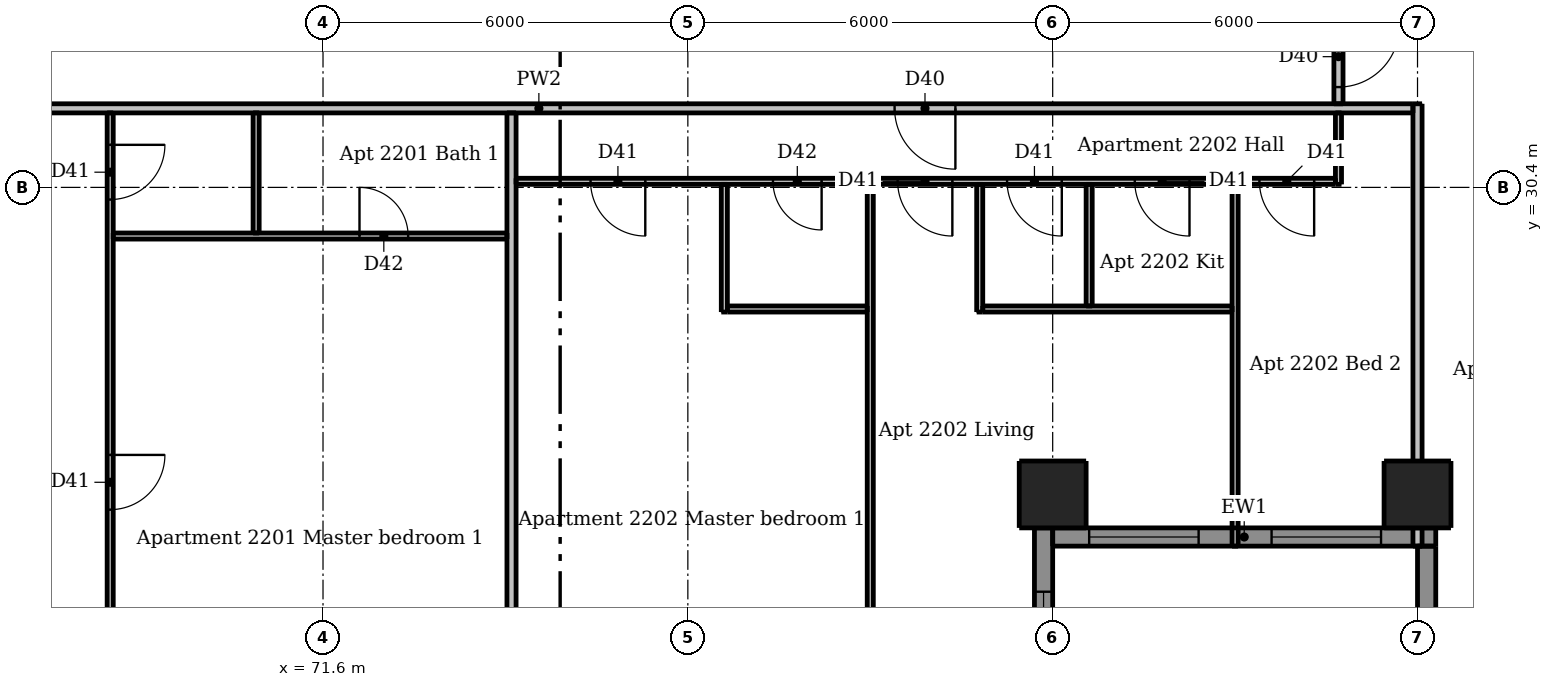
"""IFC4 building model, lengths in metres.
Left out: names, types, materials, properties, quantities, classifications, styles, units other than length and angle.
Written with IfcOpenShell. Run it as: python <this file> out.ifc"""

import sys

from ifc_helpers import new_model, si_unit, direction, frame, frame_2d, origin, origin_2d, place, context, subcontext, project, spatial, rectangle, extrude, element, fill, save


model = new_model("IFC4")
c1 = context("Model", 3, precision=1e-05, world=origin(), true_north=direction((0.0, 1.0)))
c2 = subcontext(c1, "Body", "Model", "MODEL_VIEW")
j1 = project(units=[si_unit("LENGTHUNIT", "METRE"), si_unit("PLANEANGLEUNIT", "RADIAN")], contexts=[c1])
p1 = place(None, origin())
s1 = spatial("IfcSite", under=j1, at=p1, CompositionType="ELEMENT")
p2 = place(p1, origin())
s2 = spatial("IfcBuilding", under=s1, at=p2, CompositionType="ELEMENT")
p3 = place(p2, frame((0.0, 0.0, 85.3)))
s3 = spatial("IfcBuildingStorey", under=s2, at=p3, CompositionType="ELEMENT", Elevation=85.3)
for number, where, z_axis, x_axis in (
    (1, (83.6, 25.35, 0.0), (0.0, 0.0, 1.0), (1.0, 0.0, 0.0)),
    (2, (89.6, 25.35, 0.0), (0.0, 0.0, 1.0), (1.0, 0.0, 0.0)),
):
    element("IfcColumn", number, at=place(p3, frame(where, z_axis=z_axis, x_axis=x_axis)), inside=s3, PredefinedType="COLUMN", context=c2, shape_type="SweptSolid", body=[
        extrude(rectangle(XDim=1.1, YDim=1.1, at=origin_2d()), origin(), (0.0, 0.0, 1.0), 3.05),
    ])
p4 = place(p3, frame((83.45, 21.5, 0.0), z_axis=(0.0, 0.0, 1.0), x_axis=(0.0, 1.0, 0.0)))
e3 = element("IfcWall", 3, at=p4, inside=s3, PredefinedType="SOLIDWALL", context=c2, shape_type="SweptSolid", body=[
    extrude(rectangle(XDim=3.3, YDim=0.3, at=frame_2d((1.65, 0.0))), origin(), (0.0, 0.0, 1.0), 3.05),
])
p5 = place(p4, frame((0.75, 0.0, 0.9)))
e4 = element("IfcOpeningElement", 4, at=p5, cuts=e3, PredefinedType="OPENING", context=c2, shape_type="SweptSolid", body=[
    extrude(rectangle(XDim=1.5, YDim=1.5, at=frame_2d((0.75, 0.75))), frame((0.0, 0.16, 0.0), z_axis=(0.0, -1.0, 0.0), x_axis=(1.0, 0.0, 0.0)), (0.0, 0.0, 1.0), 0.32),
])
p6 = place(p3, frame((89.75, 24.5, 0.0), z_axis=(0.0, 0.0, 1.0), x_axis=(0.0, -1.0, 0.0)))
e5 = element("IfcWall", 5, at=p6, inside=s3, PredefinedType="SOLIDWALL", context=c2, shape_type="SweptSolid", body=[
    extrude(rectangle(XDim=4.5, YDim=0.3, at=frame_2d((2.25, 0.0))), origin(), (0.0, 0.0, 1.0), 3.05),
])
p7 = place(p6, frame((1.05, 0.0, 0.15)))
e6 = element("IfcOpeningElement", 6, at=p7, cuts=e5, PredefinedType="OPENING", context=c2, shape_type="SweptSolid", body=[
    extrude(rectangle(XDim=2.4, YDim=2.1, at=frame_2d((1.2, 1.05))), frame((0.0, 0.16, 0.0), z_axis=(0.0, -1.0, 0.0), x_axis=(1.0, 0.0, 0.0)), (0.0, 0.0, 1.0), 0.32),
])
p8 = place(p3, frame((83.6, 24.65, 0.0), z_axis=(0.0, 0.0, 1.0), x_axis=(1.0, 0.0, 0.0)))
e7 = element("IfcWall", 7, at=p8, inside=s3, PredefinedType="SOLIDWALL", context=c2, shape_type="SweptSolid", body=[
    extrude(rectangle(XDim=6.3, YDim=0.3, at=frame_2d((3.15, 0.0))), origin(), (0.0, 0.0, 1.0), 3.05),
])
p9 = place(p8, frame((0.6, 0.0, 0.15)))
e8 = element("IfcOpeningElement", 8, at=p9, cuts=e7, PredefinedType="OPENING", context=c2, shape_type="SweptSolid", body=[
    extrude(rectangle(XDim=1.8, YDim=2.1, at=frame_2d((0.9, 1.05))), frame((0.0, 0.16, 0.0), z_axis=(0.0, -1.0, 0.0), x_axis=(1.0, 0.0, 0.0)), (0.0, 0.0, 1.0), 0.32),
])
p10 = place(p8, frame((3.6, 0.0, 0.15)))
e9 = element("IfcOpeningElement", 9, at=p10, cuts=e7, PredefinedType="OPENING", context=c2, shape_type="SweptSolid", body=[
    extrude(rectangle(XDim=1.8, YDim=2.1, at=frame_2d((0.9, 1.05))), frame((0.0, 0.16, 0.0), z_axis=(0.0, -1.0, 0.0), x_axis=(1.0, 0.0, 0.0)), (0.0, 0.0, 1.0), 0.32),
])
p11 = place(p3, frame((68.1, 31.625, 0.0), z_axis=(0.0, 0.0, 1.0), x_axis=(0.0, -1.0, 0.0)))
e10 = element("IfcWall", 10, at=p11, inside=s3, PredefinedType="PARTITIONING", context=c2, shape_type="SweptSolid", body=[
    extrude(rectangle(XDim=10.125, YDim=0.1, at=frame_2d((5.062, 0.0))), origin(), (0.0, 0.0, 1.0), 3.05),
])
p12 = place(p11, frame((0.525, 0.0, 0.0)))
e11 = element("IfcOpeningElement", 11, at=p12, cuts=e10, PredefinedType="OPENING", context=c2, shape_type="SweptSolid", body=[
    extrude(rectangle(XDim=0.9, YDim=2.1, at=frame_2d((0.45, 1.05))), frame((0.0, 0.06, 0.0), z_axis=(0.0, -1.0, 0.0), x_axis=(1.0, 0.0, 0.0)), (0.0, 0.0, 1.0), 0.12),
])
p13 = place(p11, frame((5.625, 0.0, 0.0)))
e12 = element("IfcOpeningElement", 12, at=p13, cuts=e10, PredefinedType="OPENING", context=c2, shape_type="SweptSolid", body=[
    extrude(rectangle(XDim=0.9, YDim=2.1, at=frame_2d((0.45, 1.05))), frame((0.0, 0.06, 0.0), z_axis=(0.0, -1.0, 0.0), x_axis=(1.0, 0.0, 0.0)), (0.0, 0.0, 1.0), 0.12),
])
p14 = place(p3, frame((70.5, 29.65, 0.0), z_axis=(0.0, 0.0, 1.0), x_axis=(0.0, 1.0, 0.0)))
e13 = element("IfcWall", 13, at=p14, inside=s3, PredefinedType="PARTITIONING", context=c2, shape_type="SweptSolid", body=[
    extrude(rectangle(XDim=1.975, YDim=0.1, at=frame_2d((0.988, 0.0))), origin(), (0.0, 0.0, 1.0), 3.05),
])
p15 = place(p3, frame((78.2, 28.35, 0.0), z_axis=(0.0, 0.0, 1.0), x_axis=(0.0, 1.0, 0.0)))
e14 = element("IfcWall", 14, at=p15, inside=s3, PredefinedType="PARTITIONING", context=c2, shape_type="SweptSolid", body=[
    extrude(rectangle(XDim=2.1, YDim=0.1, at=frame_2d((1.05, 0.0))), origin(), (0.0, 0.0, 1.0), 3.05),
])
p16 = place(p3, frame((80.6, 21.5, 0.0), z_axis=(0.0, 0.0, 1.0), x_axis=(0.0, 1.0, 0.0)))
e15 = element("IfcWall", 15, at=p16, inside=s3, PredefinedType="PARTITIONING", context=c2, shape_type="SweptSolid", body=[
    extrude(rectangle(XDim=8.95, YDim=0.1, at=frame_2d((4.475, 0.0))), origin(), (0.0, 0.0, 1.0), 3.05),
])
p17 = place(p3, frame((82.4, 28.35, 0.0), z_axis=(0.0, 0.0, 1.0), x_axis=(0.0, 1.0, 0.0)))
e16 = element("IfcWall", 16, at=p17, inside=s3, PredefinedType="PARTITIONING", context=c2, shape_type="SweptSolid", body=[
    extrude(rectangle(XDim=2.1, YDim=0.1, at=frame_2d((1.05, 0.0))), origin(), (0.0, 0.0, 1.0), 3.05),
])
p18 = place(p3, frame((84.2, 28.45, 0.0), z_axis=(0.0, 0.0, 1.0), x_axis=(0.0, 1.0, 0.0)))
e17 = element("IfcWall", 17, at=p18, inside=s3, PredefinedType="PARTITIONING", context=c2, shape_type="SweptSolid", body=[
    extrude(rectangle(XDim=2.0, YDim=0.1, at=frame_2d((1.0, 0.0))), origin(), (0.0, 0.0, 1.0), 3.05),
])
p19 = place(p3, frame((86.6, 24.5, 0.0), z_axis=(0.0, 0.0, 1.0), x_axis=(0.0, 1.0, 0.0)))
e18 = element("IfcWall", 18, at=p19, inside=s3, PredefinedType="PARTITIONING", context=c2, shape_type="SweptSolid", body=[
    extrude(rectangle(XDim=5.95, YDim=0.1, at=frame_2d((2.975, 0.0))), origin(), (0.0, 0.0, 1.0), 3.05),
])
p20 = place(p3, frame((88.3, 30.45, 0.0), z_axis=(0.0, 0.0, 1.0), x_axis=(0.0, 1.0, 0.0)))
e19 = element("IfcWall", 19, at=p20, inside=s3, PredefinedType="PARTITIONING", context=c2, shape_type="SweptSolid", body=[
    extrude(rectangle(XDim=1.175, YDim=0.1, at=frame_2d((0.587, 0.0))), origin(), (0.0, 0.0, 1.0), 3.05),
])
p21 = place(p3, frame((88.25, 30.5, 0.0), z_axis=(0.0, 0.0, 1.0), x_axis=(-1.0, 0.0, 0.0)))
e20 = element("IfcWall", 20, at=p21, inside=s3, PredefinedType="PARTITIONING", context=c2, shape_type="SweptSolid", body=[
    extrude(rectangle(XDim=13.475, YDim=0.1, at=frame_2d((6.738, 0.0))), origin(), (0.0, 0.0, 1.0), 3.05),
])
p22 = place(p21, frame((6.3, 0.0, 0.0)))
e21 = element("IfcOpeningElement", 21, at=p22, cuts=e20, PredefinedType="OPENING", context=c2, shape_type="SweptSolid", body=[
    extrude(rectangle(XDim=0.9, YDim=2.1, at=frame_2d((0.45, 1.05))), frame((0.0, 0.06, 0.0), z_axis=(0.0, -1.0, 0.0), x_axis=(1.0, 0.0, 0.0)), (0.0, 0.0, 1.0), 0.12),
])
p23 = place(p21, frame((2.4, 0.0, 0.0)))
e22 = element("IfcOpeningElement", 22, at=p23, cuts=e20, PredefinedType="OPENING", context=c2, shape_type="SweptSolid", body=[
    extrude(rectangle(XDim=0.9, YDim=2.1, at=frame_2d((0.45, 1.05))), frame((0.0, 0.06, 0.0), z_axis=(0.0, -1.0, 0.0), x_axis=(1.0, 0.0, 0.0)), (0.0, 0.0, 1.0), 0.12),
])
p24 = place(p21, frame((4.5, 0.0, 0.0)))
e23 = element("IfcOpeningElement", 23, at=p24, cuts=e20, PredefinedType="OPENING", context=c2, shape_type="SweptSolid", body=[
    extrude(rectangle(XDim=0.9, YDim=2.1, at=frame_2d((0.45, 1.05))), frame((0.0, 0.06, 0.0), z_axis=(0.0, -1.0, 0.0), x_axis=(1.0, 0.0, 0.0)), (0.0, 0.0, 1.0), 0.12),
])
p25 = place(p21, frame((11.35, 0.0, 0.0)))
e24 = element("IfcOpeningElement", 24, at=p25, cuts=e20, PredefinedType="OPENING", context=c2, shape_type="SweptSolid", body=[
    extrude(rectangle(XDim=0.9, YDim=2.1, at=frame_2d((0.45, 1.05))), frame((0.0, 0.06, 0.0), z_axis=(0.0, -1.0, 0.0), x_axis=(1.0, 0.0, 0.0)), (0.0, 0.0, 1.0), 0.12),
])
p26 = place(p21, frame((0.35, 0.0, 0.0)))
e25 = element("IfcOpeningElement", 25, at=p26, cuts=e20, PredefinedType="OPENING", context=c2, shape_type="SweptSolid", body=[
    extrude(rectangle(XDim=0.9, YDim=2.1, at=frame_2d((0.45, 1.05))), frame((0.0, 0.06, 0.0), z_axis=(0.0, -1.0, 0.0), x_axis=(1.0, 0.0, 0.0)), (0.0, 0.0, 1.0), 0.12),
])
p27 = place(p21, frame((8.45, 0.0, 0.0)))
e26 = element("IfcOpeningElement", 26, at=p27, cuts=e20, PredefinedType="OPENING", context=c2, shape_type="SweptSolid", body=[
    extrude(rectangle(XDim=0.8, YDim=2.1, at=frame_2d((0.4, 1.05))), frame((0.0, 0.06, 0.0), z_axis=(0.0, -1.0, 0.0), x_axis=(1.0, 0.0, 0.0)), (0.0, 0.0, 1.0), 0.12),
])
p28 = place(p3, frame((68.15, 29.6, 0.0), z_axis=(0.0, 0.0, 1.0), x_axis=(1.0, 0.0, 0.0)))
e27 = element("IfcWall", 27, at=p28, inside=s3, PredefinedType="PARTITIONING", context=c2, shape_type="SweptSolid", body=[
    extrude(rectangle(XDim=6.475, YDim=0.1, at=frame_2d((3.238, 0.0))), origin(), (0.0, 0.0, 1.0), 3.05),
])
p29 = place(p28, frame((4.05, 0.0, 0.0)))
e28 = element("IfcOpeningElement", 28, at=p29, cuts=e27, PredefinedType="OPENING", context=c2, shape_type="SweptSolid", body=[
    extrude(rectangle(XDim=0.8, YDim=2.1, at=frame_2d((0.4, 1.05))), frame((0.0, 0.06, 0.0), z_axis=(0.0, -1.0, 0.0), x_axis=(1.0, 0.0, 0.0)), (0.0, 0.0, 1.0), 0.12),
])
p30 = place(p3, frame((78.25, 28.4, 0.0), z_axis=(0.0, 0.0, 1.0), x_axis=(1.0, 0.0, 0.0)))
e29 = element("IfcWall", 29, at=p30, inside=s3, PredefinedType="PARTITIONING", context=c2, shape_type="SweptSolid", body=[
    extrude(rectangle(XDim=2.3, YDim=0.1, at=frame_2d((1.15, 0.0))), origin(), (0.0, 0.0, 1.0), 3.05),
])
p31 = place(p3, frame((82.45, 28.4, 0.0), z_axis=(0.0, 0.0, 1.0), x_axis=(1.0, 0.0, 0.0)))
e30 = element("IfcWall", 30, at=p31, inside=s3, PredefinedType="PARTITIONING", context=c2, shape_type="SweptSolid", body=[
    extrude(rectangle(XDim=4.1, YDim=0.1, at=frame_2d((2.05, 0.0))), origin(), (0.0, 0.0, 1.0), 3.05),
])
p32 = place(p3, frame((74.7, 21.5, 0.0), z_axis=(0.0, 0.0, 1.0), x_axis=(0.0, 1.0, 0.0)))
e31 = element("IfcWall", 31, at=p32, inside=s3, PredefinedType="PARTITIONING", context=c2, shape_type="SweptSolid", body=[
    extrude(rectangle(XDim=10.125, YDim=0.15, at=frame_2d((5.062, 0.0))), origin(), (0.0, 0.0, 1.0), 3.05),
])
p33 = place(p3, frame((88.3, 60.475, 0.0), z_axis=(0.0, 0.0, 1.0), x_axis=(0.0, -1.0, 0.0)))
e32 = element("IfcWall", 32, at=p33, inside=s3, PredefinedType="PARTITIONING", context=c2, shape_type="SweptSolid", body=[
    extrude(rectangle(XDim=28.7, YDim=0.15, at=frame_2d((14.35, 0.0))), origin(), (0.0, 0.0, 1.0), 3.05),
])
p34 = place(p33, frame((27.425, 0.0, 0.0)))
e33 = element("IfcOpeningElement", 33, at=p34, cuts=e32, PredefinedType="OPENING", context=c2, shape_type="SweptSolid", body=[
    extrude(rectangle(XDim=1.0, YDim=2.1, at=frame_2d((0.5, 1.05))), frame((0.0, 0.085, 0.0), z_axis=(0.0, -1.0, 0.0), x_axis=(1.0, 0.0, 0.0)), (0.0, 0.0, 1.0), 0.17),
])
p35 = place(p33, frame((10.575, 0.0, 0.0)))
e34 = element("IfcOpeningElement", 34, at=p35, cuts=e32, PredefinedType="OPENING", context=c2, shape_type="SweptSolid", body=[
    extrude(rectangle(XDim=1.0, YDim=2.1, at=frame_2d((0.5, 1.05))), frame((0.0, 0.085, 0.0), z_axis=(0.0, -1.0, 0.0), x_axis=(1.0, 0.0, 0.0)), (0.0, 0.0, 1.0), 0.17),
])
p36 = place(p3, frame((89.6, 24.5, 0.0), z_axis=(0.0, 0.0, 1.0), x_axis=(0.0, 1.0, 0.0)))
e35 = element("IfcWall", 35, at=p36, inside=s3, PredefinedType="PARTITIONING", context=c2, shape_type="SweptSolid", body=[
    extrude(rectangle(XDim=7.275, YDim=0.15, at=frame_2d((3.637, 0.0))), origin(), (0.0, 0.0, 1.0), 2.516),
])
p37 = place(p3, frame((89.525, 31.7, 0.0), z_axis=(0.0, 0.0, 1.0), x_axis=(-1.0, 0.0, 0.0)))
e36 = element("IfcWall", 36, at=p37, inside=s3, PredefinedType="PARTITIONING", context=c2, shape_type="SweptSolid", body=[
    extrude(rectangle(XDim=28.75, YDim=0.15, at=frame_2d((14.375, 0.0))), origin(), (0.0, 0.0, 1.0), 3.05),
])
p38 = place(p37, frame((24.625, 0.0, 0.0)))
e37 = element("IfcOpeningElement", 37, at=p38, cuts=e36, PredefinedType="OPENING", context=c2, shape_type="SweptSolid", body=[
    extrude(rectangle(XDim=1.0, YDim=2.1, at=frame_2d((0.5, 1.05))), frame((0.0, 0.085, 0.0), z_axis=(0.0, -1.0, 0.0), x_axis=(1.0, 0.0, 0.0)), (0.0, 0.0, 1.0), 0.17),
])
p39 = place(p37, frame((7.525, 0.0, 0.0)))
e38 = element("IfcOpeningElement", 38, at=p39, cuts=e36, PredefinedType="OPENING", context=c2, shape_type="SweptSolid", body=[
    extrude(rectangle(XDim=1.0, YDim=2.1, at=frame_2d((0.5, 1.05))), frame((0.0, 0.085, 0.0), z_axis=(0.0, -1.0, 0.0), x_axis=(1.0, 0.0, 0.0)), (0.0, 0.0, 1.0), 0.17),
])
p40 = place(p5, origin())
e39 = element("IfcWindow", 39, at=p40, inside=s3, PartitioningType="DOUBLE_PANEL_VERTICAL", PredefinedType="WINDOW", context=c2, shape_type="SweptSolid", body=[
    extrude(rectangle(XDim=1.5, YDim=1.5, at=frame_2d((0.75, 0.75))), frame((0.0, 0.03, 0.0), z_axis=(0.0, -1.0, 0.0), x_axis=(1.0, 0.0, 0.0)), (0.0, 0.0, 1.0), 0.06),
])
fill(e4, e39)
p41 = place(p9, origin())
e40 = element("IfcWindow", 40, at=p41, inside=s3, PartitioningType="DOUBLE_PANEL_VERTICAL", PredefinedType="WINDOW", context=c2, shape_type="SweptSolid", body=[
    extrude(rectangle(XDim=1.8, YDim=2.1, at=frame_2d((0.9, 1.05))), frame((0.0, 0.03, 0.0), z_axis=(0.0, -1.0, 0.0), x_axis=(1.0, 0.0, 0.0)), (0.0, 0.0, 1.0), 0.06),
])
fill(e8, e40)
p42 = place(p10, origin())
e41 = element("IfcWindow", 41, at=p42, inside=s3, PartitioningType="DOUBLE_PANEL_VERTICAL", PredefinedType="WINDOW", context=c2, shape_type="SweptSolid", body=[
    extrude(rectangle(XDim=1.8, YDim=2.1, at=frame_2d((0.9, 1.05))), frame((0.0, 0.03, 0.0), z_axis=(0.0, -1.0, 0.0), x_axis=(1.0, 0.0, 0.0)), (0.0, 0.0, 1.0), 0.06),
])
fill(e9, e41)
p43 = place(p12, origin())
e42 = element("IfcDoor", 42, at=p43, inside=s3, OperationType="SINGLE_SWING_LEFT", PredefinedType="DOOR", context=c2, shape_type="SweptSolid", body=[
    extrude(rectangle(XDim=0.9, YDim=2.1, at=frame_2d((0.45, 1.05))), frame((0.0, 0.025, 0.0), z_axis=(0.0, -1.0, 0.0), x_axis=(1.0, 0.0, 0.0)), (0.0, 0.0, 1.0), 0.05),
])
fill(e11, e42)
p44 = place(p13, origin())
e43 = element("IfcDoor", 43, at=p44, inside=s3, OperationType="SINGLE_SWING_LEFT", PredefinedType="DOOR", context=c2, shape_type="SweptSolid", body=[
    extrude(rectangle(XDim=0.9, YDim=2.1, at=frame_2d((0.45, 1.05))), frame((0.0, 0.025, 0.0), z_axis=(0.0, -1.0, 0.0), x_axis=(1.0, 0.0, 0.0)), (0.0, 0.0, 1.0), 0.05),
])
fill(e12, e43)
p45 = place(p29, origin())
e44 = element("IfcDoor", 44, at=p45, inside=s3, OperationType="SINGLE_SWING_LEFT", PredefinedType="DOOR", context=c2, shape_type="SweptSolid", body=[
    extrude(rectangle(XDim=0.8, YDim=2.1, at=frame_2d((0.4, 1.05))), frame((0.0, 0.025, 0.0), z_axis=(0.0, -1.0, 0.0), x_axis=(1.0, 0.0, 0.0)), (0.0, 0.0, 1.0), 0.05),
])
fill(e28, e44)
p46 = place(p39, origin())
e45 = element("IfcDoor", 45, at=p46, inside=s3, OperationType="SINGLE_SWING_LEFT", PredefinedType="DOOR", context=c2, shape_type="SweptSolid", body=[
    extrude(rectangle(XDim=1.0, YDim=2.1, at=frame_2d((0.5, 1.05))), frame((0.0, 0.025, 0.0), z_axis=(0.0, -1.0, 0.0), x_axis=(1.0, 0.0, 0.0)), (0.0, 0.0, 1.0), 0.05),
])
fill(e38, e45)
p47 = place(p22, origin())
e46 = element("IfcDoor", 46, at=p47, inside=s3, OperationType="SINGLE_SWING_LEFT", PredefinedType="DOOR", context=c2, shape_type="SweptSolid", body=[
    extrude(rectangle(XDim=0.9, YDim=2.1, at=frame_2d((0.45, 1.05))), frame((0.0, 0.025, 0.0), z_axis=(0.0, -1.0, 0.0), x_axis=(1.0, 0.0, 0.0)), (0.0, 0.0, 1.0), 0.05),
])
fill(e21, e46)
p48 = place(p23, origin())
e47 = element("IfcDoor", 47, at=p48, inside=s3, OperationType="SINGLE_SWING_LEFT", PredefinedType="DOOR", context=c2, shape_type="SweptSolid", body=[
    extrude(rectangle(XDim=0.9, YDim=2.1, at=frame_2d((0.45, 1.05))), frame((0.0, 0.025, 0.0), z_axis=(0.0, -1.0, 0.0), x_axis=(1.0, 0.0, 0.0)), (0.0, 0.0, 1.0), 0.05),
])
fill(e22, e47)
p49 = place(p24, origin())
e48 = element("IfcDoor", 48, at=p49, inside=s3, OperationType="SINGLE_SWING_LEFT", PredefinedType="DOOR", context=c2, shape_type="SweptSolid", body=[
    extrude(rectangle(XDim=0.9, YDim=2.1, at=frame_2d((0.45, 1.05))), frame((0.0, 0.025, 0.0), z_axis=(0.0, -1.0, 0.0), x_axis=(1.0, 0.0, 0.0)), (0.0, 0.0, 1.0), 0.05),
])
fill(e23, e48)
p50 = place(p25, origin())
e49 = element("IfcDoor", 49, at=p50, inside=s3, OperationType="SINGLE_SWING_LEFT", PredefinedType="DOOR", context=c2, shape_type="SweptSolid", body=[
    extrude(rectangle(XDim=0.9, YDim=2.1, at=frame_2d((0.45, 1.05))), frame((0.0, 0.025, 0.0), z_axis=(0.0, -1.0, 0.0), x_axis=(1.0, 0.0, 0.0)), (0.0, 0.0, 1.0), 0.05),
])
fill(e24, e49)
p51 = place(p26, origin())
e50 = element("IfcDoor", 50, at=p51, inside=s3, OperationType="SINGLE_SWING_LEFT", PredefinedType="DOOR", context=c2, shape_type="SweptSolid", body=[
    extrude(rectangle(XDim=0.9, YDim=2.1, at=frame_2d((0.45, 1.05))), frame((0.0, 0.025, 0.0), z_axis=(0.0, -1.0, 0.0), x_axis=(1.0, 0.0, 0.0)), (0.0, 0.0, 1.0), 0.05),
])
fill(e25, e50)
p52 = place(p27, origin())
e51 = element("IfcDoor", 51, at=p52, inside=s3, OperationType="SINGLE_SWING_LEFT", PredefinedType="DOOR", context=c2, shape_type="SweptSolid", body=[
    extrude(rectangle(XDim=0.8, YDim=2.1, at=frame_2d((0.4, 1.05))), frame((0.0, 0.025, 0.0), z_axis=(0.0, -1.0, 0.0), x_axis=(1.0, 0.0, 0.0)), (0.0, 0.0, 1.0), 0.05),
])
fill(e26, e51)
p53 = place(p34, origin())
e52 = element("IfcDoor", 52, at=p53, inside=s3, OperationType="SINGLE_SWING_LEFT", PredefinedType="DOOR", context=c2, shape_type="SweptSolid", body=[
    extrude(rectangle(XDim=1.0, YDim=2.1, at=frame_2d((0.5, 1.05))), frame((0.0, 0.025, 0.0), z_axis=(0.0, -1.0, 0.0), x_axis=(1.0, 0.0, 0.0)), (0.0, 0.0, 1.0), 0.05),
])
fill(e33, e52)
save(model, sys.argv[1])
